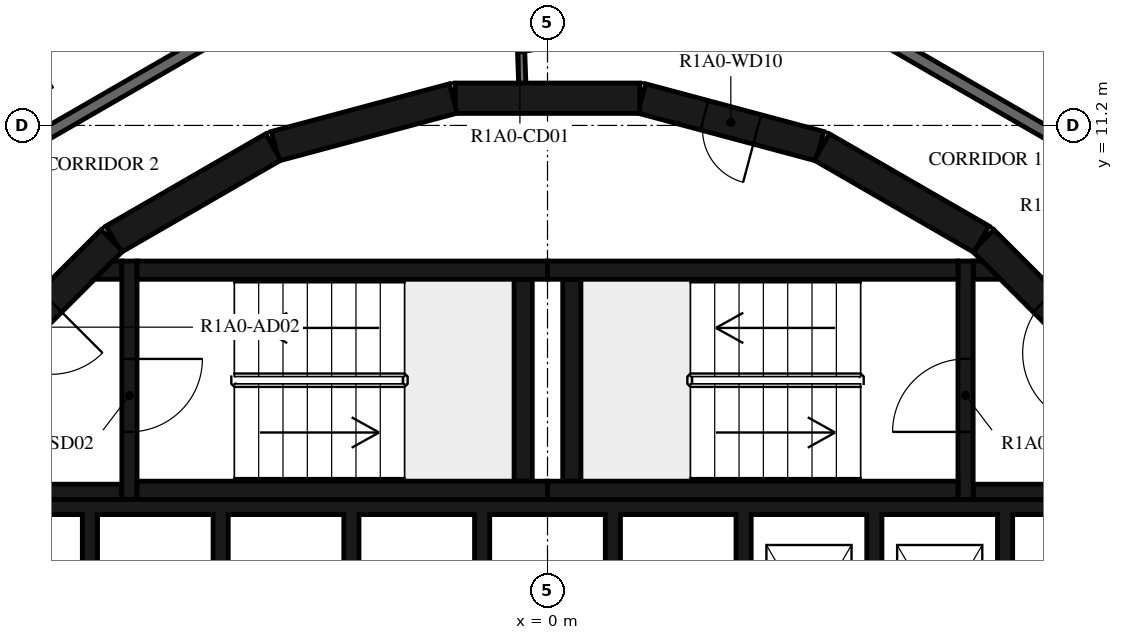
"""IFC4 building model, lengths in metres.
Left out: names, types, materials, properties, quantities, classifications, styles, units other than length and angle.
Written with IfcOpenShell. Run it as: python <this file> out.ifc"""

import sys

from ifc_helpers import new_model, si_unit, direction, frame, frame_2d, origin, place, context, subcontext, project, spatial, polyline, rectangle, outline, extrude, element, fill, save


model = new_model("IFC4")
c1 = context("Model", 3, precision=1e-05, world=origin(), true_north=direction((0.0, 1.0)))
c2 = subcontext(c1, "Body", "Model", "MODEL_VIEW")
j1 = project(units=[si_unit("LENGTHUNIT", "METRE"), si_unit("PLANEANGLEUNIT", "RADIAN")], contexts=[c1])
p1 = place(None, origin())
s1 = spatial("IfcSite", under=j1, at=p1, CompositionType="ELEMENT")
p2 = place(p1, origin())
s2 = spatial("IfcBuilding", under=s1, at=p2, CompositionType="ELEMENT")
p3 = place(p2, frame((0.0, 0.0, 38.4)))
s3 = spatial("IfcBuildingStorey", under=s2, at=p3, CompositionType="ELEMENT", Elevation=38.4)
p4 = place(p3, frame((9.308, 7.164, 0.0), z_axis=(0.0, 0.0, 1.0), x_axis=(-0.707106781187, 0.707106781187, 0.0)))
e1 = element("IfcWall", 1, at=p4, inside=s3, PredefinedType="SHEAR", context=c2, shape_type="SweptSolid", body=[
    extrude(rectangle(XDim=3.032, YDim=0.5, at=frame_2d((1.516, 0.0))), origin(), (0.0, 0.0, 1.0), 3.12),
])
p5 = place(p4, frame((0.416, 0.0, 0.0)))
e2 = element("IfcOpeningElement", 2, at=p5, cuts=e1, PredefinedType="OPENING", context=c2, shape_type="SweptSolid", body=[
    extrude(rectangle(XDim=1.2, YDim=2.1, at=frame_2d((0.6, 1.05))), frame((0.0, 0.26, 0.0), z_axis=(0.0, -1.0, 0.0), x_axis=(1.0, 0.0, 0.0)), (0.0, 0.0, 1.0), 0.52),
])
p6 = place(p3, frame((7.137, 9.329, 0.0), z_axis=(0.0, 0.0, 1.0), x_axis=(-0.865975092491, 0.500087131594, 0.0)))
e3 = element("IfcWall", 3, at=p6, inside=s3, PredefinedType="SHEAR", context=c2, shape_type="SweptSolid", body=[
    extrude(rectangle(XDim=3.033, YDim=0.5, at=frame_2d((1.516, 0.0))), origin(), (0.0, 0.0, 1.0), 3.12),
])
p7 = place(p3, frame((4.479, 10.858, 0.0), z_axis=(0.0, 0.0, 1.0), x_axis=(-0.965948410781, 0.258734743916, 0.0)))
e4 = element("IfcWall", 4, at=p7, inside=s3, PredefinedType="SHEAR", context=c2, shape_type="SweptSolid", body=[
    extrude(rectangle(XDim=3.033, YDim=0.5, at=frame_2d((1.516, 0.0))), origin(), (0.0, 0.0, 1.0), 3.12),
])
p8 = place(p7, frame((1.066, 0.0, 0.0)))
e5 = element("IfcOpeningElement", 5, at=p8, cuts=e4, PredefinedType="OPENING", context=c2, shape_type="SweptSolid", body=[
    extrude(rectangle(XDim=0.9, YDim=2.1, at=frame_2d((0.45, 1.05))), frame((0.0, 0.26, 0.0), z_axis=(0.0, -1.0, 0.0), x_axis=(1.0, 0.0, 0.0)), (0.0, 0.0, 1.0), 0.52),
])
for number, where, z_axis, x_axis in (
    (6, (1.516, 11.647, 0.0), (0.0, 0.0, 1.0), (-1.0, 0.0, 0.0)),
    (7, (-1.55, 11.643, 0.0), (0.0, 0.0, 1.0), (-0.966, -0.259, 0.0)),
    (8, (-4.51, 10.845, 0.0), (0.0, 0.0, 1.0), (-0.866, -0.5, 0.0)),
):
    element("IfcWall", number, at=place(p3, frame(where, z_axis=z_axis, x_axis=x_axis)), inside=s3, PredefinedType="SHEAR", context=c2, shape_type="SweptSolid", body=[
        extrude(rectangle(XDim=3.033, YDim=0.5, at=frame_2d((1.516, 0.0))), origin(), (0.0, 0.0, 1.0), 3.12),
    ])
p9 = place(p3, frame((-7.164, 9.308, 0.0), z_axis=(0.0, 0.0, 1.0), x_axis=(-0.707106781187, -0.707106781187, 0.0)))
e9 = element("IfcWall", 9, at=p9, inside=s3, PredefinedType="SHEAR", context=c2, shape_type="SweptSolid", body=[
    extrude(rectangle(XDim=3.032, YDim=0.5, at=frame_2d((1.516, 0.0))), origin(), (0.0, 0.0, 1.0), 3.12),
])
p10 = place(p9, frame((1.416, 0.0, 0.0)))
e10 = element("IfcOpeningElement", 10, at=p10, cuts=e9, PredefinedType="OPENING", context=c2, shape_type="SweptSolid", body=[
    extrude(rectangle(XDim=1.2, YDim=2.1, at=frame_2d((0.6, 1.05))), frame((0.0, 0.26, 0.0), z_axis=(0.0, -1.0, 0.0), x_axis=(1.0, 0.0, 0.0)), (0.0, 0.0, 1.0), 0.52),
])
for number, where, z_axis, x_axis in (
    (11, (0.0, 5.2, 0.0), (0.0, 0.0, 1.0), (1.0, 0.0, 0.0)),
    (12, (0.0, 8.82, 0.0), (0.0, 0.0, 1.0), (1.0, 0.0, 0.0)),
):
    element("IfcWall", number, at=place(p3, frame(where, z_axis=z_axis, x_axis=x_axis)), inside=s3, PredefinedType="SHEAR", context=c2, shape_type="SweptSolid", body=[
        extrude(rectangle(XDim=6.75, YDim=0.3, at=frame_2d((3.375, 0.0))), origin(), (0.0, 0.0, 1.0), 3.12),
    ])
p11 = place(p3, frame((0.4, 5.35, 0.0), z_axis=(0.0, 0.0, 1.0), x_axis=(0.0, 1.0, 0.0)))
e13 = element("IfcWall", 13, at=p11, inside=s3, PredefinedType="SHEAR", context=c2, shape_type="SweptSolid", body=[
    extrude(rectangle(XDim=3.32, YDim=0.3, at=frame_2d((1.66, 0.0))), origin(), (0.0, 0.0, 1.0), 3.12),
])
p12 = place(p3, frame((6.875, 5.05, 0.0), z_axis=(0.0, 0.0, 1.0), x_axis=(0.0, 1.0, 0.0)))
e14 = element("IfcWall", 14, at=p12, inside=s3, PredefinedType="SHEAR", context=c2, shape_type="SweptSolid", body=[
    extrude(rectangle(XDim=3.92, YDim=0.25, at=frame_2d((1.96, 0.0))), origin(), (0.0, 0.0, 1.0), 3.12),
])
p13 = place(p12, frame((1.11, 0.0, 0.0)))
e15 = element("IfcOpeningElement", 15, at=p13, cuts=e14, PredefinedType="OPENING", context=c2, shape_type="SweptSolid", body=[
    extrude(rectangle(XDim=1.2, YDim=2.1, at=frame_2d((0.6, 1.05))), frame((0.0, 0.135, 0.0), z_axis=(0.0, -1.0, 0.0), x_axis=(1.0, 0.0, 0.0)), (0.0, 0.0, 1.0), 0.27),
])
p14 = place(p3, frame((7.0, 5.175, 0.0), z_axis=(0.0, 0.0, 1.0), x_axis=(1.0, 0.0, 0.0)))
e16 = element("IfcWall", 16, at=p14, inside=s3, PredefinedType="SHEAR", context=c2, shape_type="SweptSolid", body=[
    extrude(rectangle(XDim=3.1, YDim=0.25, at=frame_2d((1.55, 0.0))), origin(), (0.0, 0.0, 1.0), 3.12),
])
p15 = place(p3, origin())
e17 = element("IfcWall", 17, at=p15, inside=s3, PredefinedType="SHEAR", context=c2, shape_type="SweptSolid", body=[
    extrude(outline(polyline([(7.448, 8.67), (7.0, 8.67), (7.0, 8.97), (7.148, 8.97), (7.448, 8.67)])), origin(), (0.0, 0.0, 1.0), 3.12),
])
for number, where, z_axis, x_axis in (
    (18, (-6.75, 5.2, 0.0), (0.0, 0.0, 1.0), (1.0, 0.0, 0.0)),
    (19, (-6.75, 8.82, 0.0), (0.0, 0.0, 1.0), (1.0, 0.0, 0.0)),
):
    element("IfcWall", number, at=place(p3, frame(where, z_axis=z_axis, x_axis=x_axis)), inside=s3, PredefinedType="SHEAR", context=c2, shape_type="SweptSolid", body=[
        extrude(rectangle(XDim=6.75, YDim=0.3, at=frame_2d((3.375, 0.0))), origin(), (0.0, 0.0, 1.0), 3.12),
    ])
p16 = place(p3, frame((-0.4, 5.35, 0.0), z_axis=(0.0, 0.0, 1.0), x_axis=(0.0, 1.0, 0.0)))
e20 = element("IfcWall", 20, at=p16, inside=s3, PredefinedType="SHEAR", context=c2, shape_type="SweptSolid", body=[
    extrude(rectangle(XDim=3.32, YDim=0.3, at=frame_2d((1.66, 0.0))), origin(), (0.0, 0.0, 1.0), 3.12),
])
p17 = place(p3, frame((-6.875, 8.97, 0.0), z_axis=(0.0, 0.0, 1.0), x_axis=(0.0, -1.0, 0.0)))
e21 = element("IfcWall", 21, at=p17, inside=s3, PredefinedType="SHEAR", context=c2, shape_type="SweptSolid", body=[
    extrude(rectangle(XDim=3.92, YDim=0.25, at=frame_2d((1.96, 0.0))), origin(), (0.0, 0.0, 1.0), 3.12),
])
p18 = place(p17, frame((1.61, 0.0, 0.0)))
e22 = element("IfcOpeningElement", 22, at=p18, cuts=e21, PredefinedType="OPENING", context=c2, shape_type="SweptSolid", body=[
    extrude(rectangle(XDim=1.2, YDim=2.1, at=frame_2d((0.6, 1.05))), frame((0.0, 0.135, 0.0), z_axis=(0.0, -1.0, 0.0), x_axis=(1.0, 0.0, 0.0)), (0.0, 0.0, 1.0), 0.27),
])
p19 = place(p3, frame((-7.0, 5.175, 0.0), z_axis=(0.0, 0.0, 1.0), x_axis=(-1.0, 0.0, 0.0)))
e23 = element("IfcWall", 23, at=p19, inside=s3, PredefinedType="SHEAR", context=c2, shape_type="SweptSolid", body=[
    extrude(rectangle(XDim=3.1, YDim=0.25, at=frame_2d((1.55, 0.0))), origin(), (0.0, 0.0, 1.0), 3.12),
])
p20 = place(p3, origin())
e24 = element("IfcWall", 24, at=p20, inside=s3, PredefinedType="SHEAR", context=c2, shape_type="SweptSolid", body=[
    extrude(outline(polyline([(-7.148, 8.97), (-7.0, 8.97), (-7.0, 8.67), (-7.448, 8.67), (-7.148, 8.97)])), origin(), (0.0, 0.0, 1.0), 3.12),
])
p21 = place(p3, origin())
e25 = element("IfcWall", 25, at=p21, inside=s3, PredefinedType="SHEAR", context=c2, shape_type="SweptSolid", body=[
    extrude(outline(polyline([(-9.55, 4.8), (-7.65, 4.8), (-7.65, 1.9), (-7.4, 1.9), (-7.4, 4.8), (-5.5, 4.8), (-5.5, 1.9), (-5.25, 1.9), (-5.25, 4.8), (-3.35, 4.8), (-3.35, 1.9), (-3.1, 1.9), (-3.1, 4.8), (-1.2, 4.8), (-1.2, 1.9), (-0.95, 1.9), (-0.95, 4.8), (0.95, 4.8), (0.95, 1.9), (1.2, 1.9), (1.2, 4.8), (3.1, 4.8), (3.1, 1.9), (3.35, 1.9), (3.35, 4.8), (5.25, 4.8), (5.25, 1.9), (5.5, 1.9), (5.5, 4.8), (7.4, 4.8), (7.4, 1.9), (7.65, 1.9), (7.65, 4.8), (9.55, 4.8), (9.55, 1.9), (9.8, 1.9), (9.8, 4.8), (9.8, 5.05), (-9.8, 5.05), (-9.8, 4.8), (-9.8, 1.9), (-9.55, 1.9), (-9.55, 4.8)])), origin(), (0.0, 0.0, 1.0), 3.12),
])
p22 = place(p3, frame((-0.479, 13.7, 0.0), z_axis=(0.0, 0.0, 1.0), x_axis=(0.034919103017, -0.999390142159, 0.0)))
e26 = element("IfcWall", 26, at=p22, inside=s3, PredefinedType="PARTITIONING", context=c2, shape_type="SweptSolid", body=[
    extrude(rectangle(XDim=1.804, YDim=0.12, at=frame_2d((0.902, 0.0))), origin(), (0.0, 0.0, 1.0), 3.12),
])
p23 = place(p22, frame((0.11, 0.0, 0.0)))
e27 = element("IfcOpeningElement", 27, at=p23, cuts=e26, PredefinedType="OPENING", context=c2, shape_type="SweptSolid", body=[
    extrude(rectangle(XDim=1.2, YDim=2.1, at=frame_2d((0.6, 1.05))), frame((0.0, 0.07, 0.0), z_axis=(0.0, -1.0, 0.0), x_axis=(1.0, 0.0, 0.0)), (0.0, 0.0, 1.0), 0.14),
])
p24 = place(p3, frame((10.029, 10.029, 0.0), z_axis=(0.0, 0.0, 1.0), x_axis=(-0.866024439905, 0.500001669485, 0.0)))
e28 = element("IfcWall", 28, at=p24, inside=s3, PredefinedType="STANDARD", context=c2, shape_type="SweptSolid", body=[
    extrude(rectangle(XDim=7.342, YDim=0.2, at=frame_2d((3.671, 0.0))), origin(), (0.0, 0.0, 1.0), 3.12),
])
p25 = place(p3, frame((-3.671, 13.7, 0.0), z_axis=(0.0, 0.0, 1.0), x_axis=(-0.866031419417, -0.499989580474, 0.0)))
e29 = element("IfcWall", 29, at=p25, inside=s3, PredefinedType="STANDARD", context=c2, shape_type="SweptSolid", body=[
    extrude(rectangle(XDim=7.147, YDim=0.2, at=frame_2d((3.573, 0.0))), origin(), (0.0, 0.0, 1.0), 3.12),
])
p26 = place(p25, frame((5.947, 0.0, 0.0)))
e30 = element("IfcOpeningElement", 30, at=p26, cuts=e29, PredefinedType="OPENING", context=c2, shape_type="SweptSolid", body=[
    extrude(rectangle(XDim=1.0, YDim=2.1, at=frame_2d((0.5, 1.05))), frame((0.0, 0.11, 0.0), z_axis=(0.0, -1.0, 0.0), x_axis=(1.0, 0.0, 0.0)), (0.0, 0.0, 1.0), 0.22),
])
p27 = place(p3, frame((11.139, 11.167, 0.0), z_axis=(0.0, 0.0, 1.0), x_axis=(-0.499994660107, 0.866028486751, 0.0)))
e31 = element("IfcWall", 31, at=p27, inside=s3, PredefinedType="PARTITIONING", context=c2, shape_type="SweptSolid", body=[
    extrude(rectangle(XDim=15.786, YDim=0.12, at=frame_2d((7.893, 0.0))), origin(), (0.0, 0.0, 1.0), 3.12),
])
p28 = place(p27, frame((5.279, 0.0, 0.0)))
e32 = element("IfcOpeningElement", 32, at=p28, cuts=e31, PredefinedType="OPENING", context=c2, shape_type="SweptSolid", body=[
    extrude(rectangle(XDim=0.9, YDim=2.1, at=frame_2d((0.45, 1.05))), frame((0.0, 0.07, 0.0), z_axis=(0.0, -1.0, 0.0), x_axis=(1.0, 0.0, 0.0)), (0.0, 0.0, 1.0), 0.14),
])
p29 = place(p27, frame((12.23, 0.0, 0.0)))
e33 = element("IfcOpeningElement", 33, at=p29, cuts=e31, PredefinedType="OPENING", context=c2, shape_type="SweptSolid", body=[
    extrude(rectangle(XDim=0.9, YDim=2.1, at=frame_2d((0.45, 1.05))), frame((0.0, 0.07, 0.0), z_axis=(0.0, -1.0, 0.0), x_axis=(1.0, 0.0, 0.0)), (0.0, 0.0, 1.0), 0.14),
])
p30 = place(p3, frame((11.127, 11.127, 0.0), z_axis=(0.0, 0.0, 1.0), x_axis=(-0.866043916853, 0.499967933054, 0.0)))
e34 = element("IfcWall", 34, at=p30, inside=s3, PredefinedType="PARTITIONING", context=c2, shape_type="SweptSolid", body=[
    extrude(rectangle(XDim=4.821, YDim=0.12, at=frame_2d((2.411, 0.0))), origin(), (0.0, 0.0, 1.0), 3.12),
])
p31 = place(p30, frame((1.4, 0.0, 0.0)))
e35 = element("IfcOpeningElement", 35, at=p31, cuts=e34, PredefinedType="OPENING", context=c2, shape_type="SweptSolid", body=[
    extrude(rectangle(XDim=0.8, YDim=2.1, at=frame_2d((0.4, 1.05))), frame((0.0, 0.07, 0.0), z_axis=(0.0, -1.0, 0.0), x_axis=(1.0, 0.0, 0.0)), (0.0, 0.0, 1.0), 0.14),
])
p32 = place(p3, frame((-4.073, 15.2, 0.0), z_axis=(0.0, 0.0, 1.0), x_axis=(-0.866024802457, -0.500001041529, 0.0)))
e36 = element("IfcWall", 36, at=p32, inside=s3, PredefinedType="PARTITIONING", context=c2, shape_type="SweptSolid", body=[
    extrude(rectangle(XDim=6.751, YDim=0.12, at=frame_2d((3.376, 0.0))), origin(), (0.0, 0.0, 1.0), 3.12),
])
p33 = place(p32, frame((0.2, 0.0, 0.0)))
e37 = element("IfcOpeningElement", 37, at=p33, cuts=e36, PredefinedType="OPENING", context=c2, shape_type="SweptSolid", body=[
    extrude(rectangle(XDim=0.8, YDim=2.1, at=frame_2d((0.4, 1.05))), frame((0.0, 0.07, 0.0), z_axis=(0.0, -1.0, 0.0), x_axis=(1.0, 0.0, 0.0)), (0.0, 0.0, 1.0), 0.14),
])
p34 = place(p32, frame((5.206, 0.0, 0.0)))
e38 = element("IfcOpeningElement", 38, at=p34, cuts=e36, PredefinedType="OPENING", context=c2, shape_type="SweptSolid", body=[
    extrude(rectangle(XDim=0.9, YDim=2.1, at=frame_2d((0.45, 1.05))), frame((0.0, 0.07, 0.0), z_axis=(0.0, -1.0, 0.0), x_axis=(1.0, 0.0, 0.0)), (0.0, 0.0, 1.0), 0.14),
])
p35 = place(p13, origin())
e39 = element("IfcDoor", 39, at=p35, inside=s3, OperationType="SINGLE_SWING_LEFT", PredefinedType="DOOR", context=c2, shape_type="SweptSolid", body=[
    extrude(rectangle(XDim=1.2, YDim=2.1, at=frame_2d((0.6, 1.05))), frame((0.0, 0.025, 0.0), z_axis=(0.0, -1.0, 0.0), x_axis=(1.0, 0.0, 0.0)), (0.0, 0.0, 1.0), 0.05),
])
fill(e15, e39)
p36 = place(p5, origin())
e40 = element("IfcDoor", 40, at=p36, inside=s3, OperationType="SINGLE_SWING_RIGHT", PredefinedType="DOOR", context=c2, shape_type="SweptSolid", body=[
    extrude(rectangle(XDim=1.2, YDim=2.1, at=frame_2d((0.6, 1.05))), frame((0.0, 0.025, 0.0), z_axis=(0.0, -1.0, 0.0), x_axis=(1.0, 0.0, 0.0)), (0.0, 0.0, 1.0), 0.05),
])
fill(e2, e40)
p37 = place(p18, origin())
e41 = element("IfcDoor", 41, at=p37, inside=s3, OperationType="SINGLE_SWING_LEFT", PredefinedType="DOOR", context=c2, shape_type="SweptSolid", body=[
    extrude(rectangle(XDim=1.2, YDim=2.1, at=frame_2d((0.6, 1.05))), frame((0.0, 0.025, 0.0), z_axis=(0.0, -1.0, 0.0), x_axis=(1.0, 0.0, 0.0)), (0.0, 0.0, 1.0), 0.05),
])
fill(e22, e41)
p38 = place(p10, origin())
e42 = element("IfcDoor", 42, at=p38, inside=s3, OperationType="SINGLE_SWING_RIGHT", PredefinedType="DOOR", context=c2, shape_type="SweptSolid", body=[
    extrude(rectangle(XDim=1.2, YDim=2.1, at=frame_2d((0.6, 1.05))), frame((0.0, 0.025, 0.0), z_axis=(0.0, -1.0, 0.0), x_axis=(1.0, 0.0, 0.0)), (0.0, 0.0, 1.0), 0.05),
])
fill(e10, e42)
p39 = place(p8, origin())
e43 = element("IfcDoor", 43, at=p39, inside=s3, OperationType="SINGLE_SWING_LEFT", PredefinedType="DOOR", context=c2, shape_type="SweptSolid", body=[
    extrude(rectangle(XDim=0.9, YDim=2.1, at=frame_2d((0.45, 1.05))), frame((0.0, 0.025, 0.0), z_axis=(0.0, -1.0, 0.0), x_axis=(1.0, 0.0, 0.0)), (0.0, 0.0, 1.0), 0.05),
])
fill(e5, e43)
p40 = place(p23, origin())
e44 = element("IfcDoor", 44, at=p40, inside=s3, OperationType="DOUBLE_DOOR_SINGLE_SWING", PredefinedType="DOOR", context=c2, shape_type="SweptSolid", body=[
    extrude(rectangle(XDim=1.2, YDim=2.1, at=frame_2d((0.6, 1.05))), frame((0.0, 0.025, 0.0), z_axis=(0.0, -1.0, 0.0), x_axis=(1.0, 0.0, 0.0)), (0.0, 0.0, 1.0), 0.05),
])
fill(e27, e44)
save(model, sys.argv[1])
